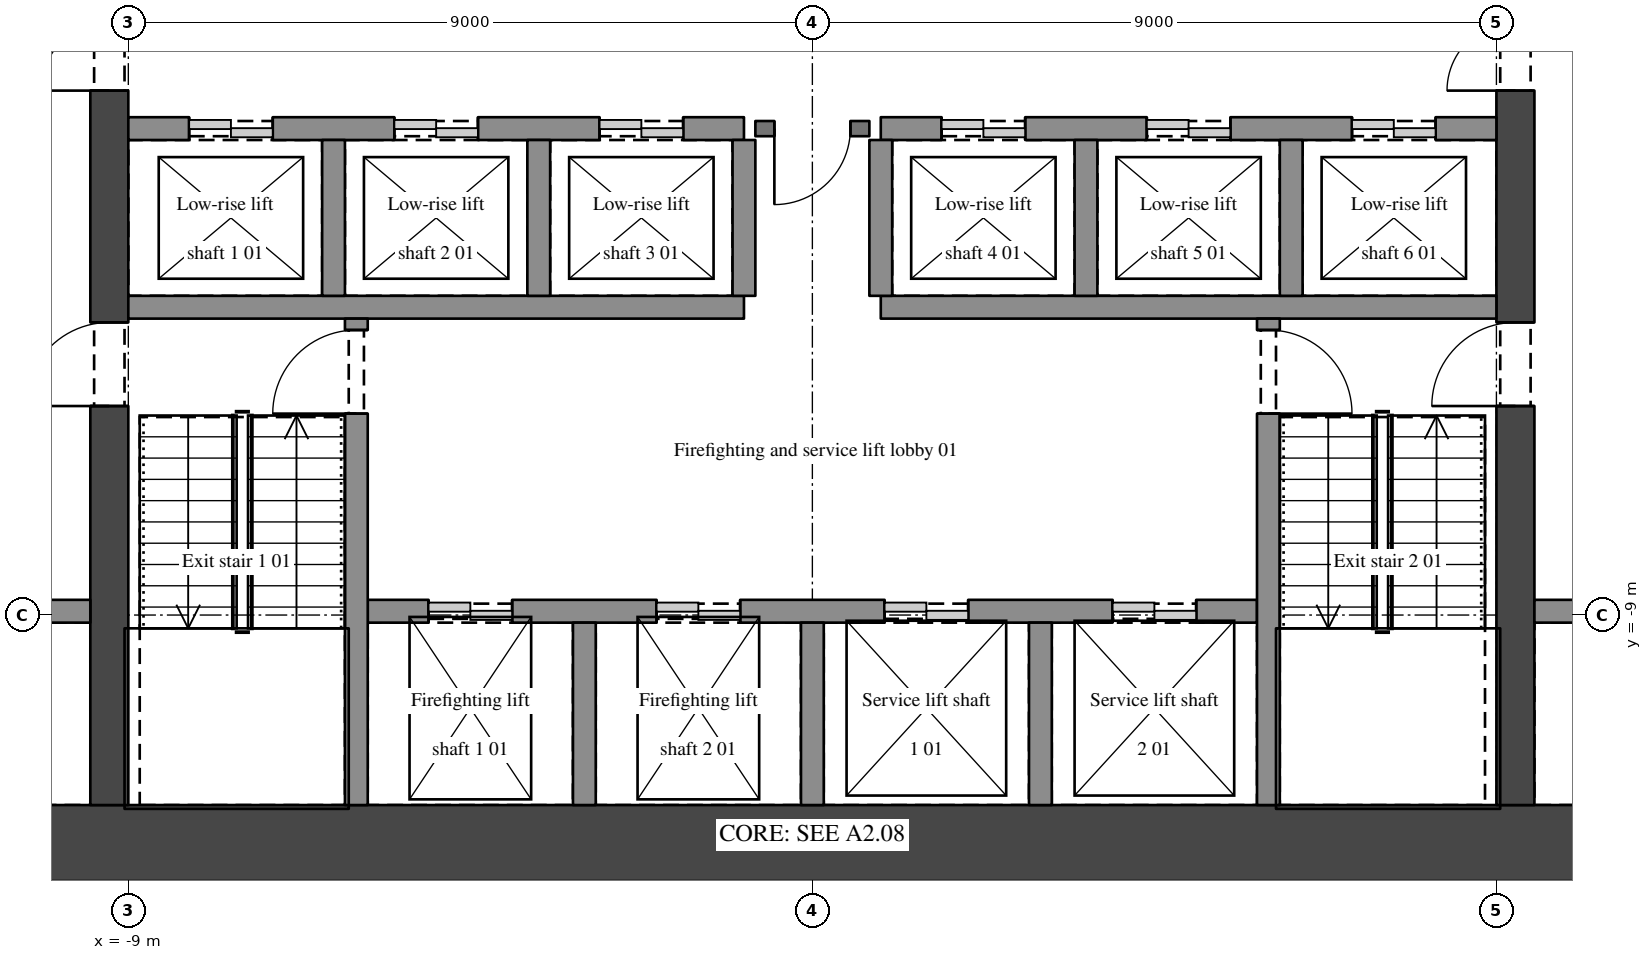
"""IFC4 building model, lengths in metres.
Left out: names, types, materials, properties, quantities, classifications, styles, units other than length and angle.
Written with IfcOpenShell. Run it as: python <this file> out.ifc"""

import sys

from ifc_helpers import new_model, si_unit, direction, frame, frame_2d, origin, place, context, subcontext, project, spatial, rectangle, extrude, element, fill, save


model = new_model("IFC4")
c1 = context("Model", 3, precision=1e-05, world=origin(), true_north=direction((0.0, 1.0)))
c2 = subcontext(c1, "Body", "Model", "MODEL_VIEW")
j1 = project(units=[si_unit("LENGTHUNIT", "METRE"), si_unit("PLANEANGLEUNIT", "RADIAN")], contexts=[c1])
p1 = place(None, origin())
s1 = spatial("IfcSite", under=j1, at=p1, CompositionType="ELEMENT")
p2 = place(p1, origin())
s2 = spatial("IfcBuilding", under=s1, at=p2, CompositionType="ELEMENT")
p3 = place(p2, frame((0.0, 0.0, 62.1)))
s3 = spatial("IfcBuildingStorey", under=s2, at=p3, CompositionType="ELEMENT", Elevation=62.1)
p4 = place(p3, frame((-15.0, -12.0, 0.0), z_axis=(0.0, 0.0, 1.0), x_axis=(1.0, 0.0, 0.0)))
e1 = element("IfcWall", 1, at=p4, inside=s3, PredefinedType="SHEAR", context=c2, shape_type="SweptSolid", body=[
    extrude(rectangle(XDim=30.0, YDim=1.0, at=frame_2d((15.0, 0.0))), origin(), (0.0, 0.0, 1.0), 3.9),
])
p5 = place(p3, frame((-9.25, -11.5, 0.0), z_axis=(0.0, 0.0, 1.0), x_axis=(0.0, 1.0, 0.0)))
e2 = element("IfcWall", 2, at=p5, inside=s3, PredefinedType="SHEAR", context=c2, shape_type="SweptSolid", body=[
    extrude(rectangle(XDim=11.65, YDim=0.5, at=frame_2d((5.825, 0.0))), origin(), (0.0, 0.0, 1.0), 3.9),
])
p6 = place(p5, frame((9.4, 0.0, 0.0)))
e3 = element("IfcOpeningElement", 3, at=p6, cuts=e2, PredefinedType="OPENING", context=c2, shape_type="SweptSolid", body=[
    extrude(rectangle(XDim=1.8, YDim=2.1, at=frame_2d((0.9, 1.05))), frame((0.0, 0.26, 0.0), z_axis=(0.0, -1.0, 0.0), x_axis=(1.0, 0.0, 0.0)), (0.0, 0.0, 1.0), 0.52),
])
p7 = place(p5, frame((5.25, 0.0, 0.0)))
e4 = element("IfcOpeningElement", 4, at=p7, cuts=e2, PredefinedType="OPENING", context=c2, shape_type="SweptSolid", body=[
    extrude(rectangle(XDim=1.1, YDim=2.1, at=frame_2d((0.55, 1.05))), frame((0.0, 0.26, 0.0), z_axis=(0.0, -1.0, 0.0), x_axis=(1.0, 0.0, 0.0)), (0.0, 0.0, 1.0), 0.52),
])
p8 = place(p3, frame((9.25, -11.5, 0.0), z_axis=(0.0, 0.0, 1.0), x_axis=(0.0, 1.0, 0.0)))
e5 = element("IfcWall", 5, at=p8, inside=s3, PredefinedType="SHEAR", context=c2, shape_type="SweptSolid", body=[
    extrude(rectangle(XDim=11.65, YDim=0.5, at=frame_2d((5.825, 0.0))), origin(), (0.0, 0.0, 1.0), 3.9),
])
p9 = place(p8, frame((9.4, 0.0, 0.0)))
e6 = element("IfcOpeningElement", 6, at=p9, cuts=e5, PredefinedType="OPENING", context=c2, shape_type="SweptSolid", body=[
    extrude(rectangle(XDim=1.8, YDim=2.1, at=frame_2d((0.9, 1.05))), frame((0.0, 0.26, 0.0), z_axis=(0.0, -1.0, 0.0), x_axis=(1.0, 0.0, 0.0)), (0.0, 0.0, 1.0), 0.52),
])
p10 = place(p8, frame((5.25, 0.0, 0.0)))
e7 = element("IfcOpeningElement", 7, at=p10, cuts=e5, PredefinedType="OPENING", context=c2, shape_type="SweptSolid", body=[
    extrude(rectangle(XDim=1.1, YDim=2.1, at=frame_2d((0.55, 1.05))), frame((0.0, 0.26, 0.0), z_axis=(0.0, -1.0, 0.0), x_axis=(1.0, 0.0, 0.0)), (0.0, 0.0, 1.0), 0.52),
])
p11 = place(p3, frame((-12.25, -8.95, 0.0), z_axis=(0.0, 0.0, 1.0), x_axis=(1.0, 0.0, 0.0)))
e8 = element("IfcWall", 8, at=p11, inside=s3, PredefinedType="SHEAR", context=c2, shape_type="SweptSolid", body=[
    extrude(rectangle(XDim=2.75, YDim=0.3, at=frame_2d((1.375, 0.0))), origin(), (0.0, 0.0, 1.0), 3.9),
])
p12 = place(p3, frame((-5.85, -8.95, 0.0), z_axis=(0.0, 0.0, 1.0), x_axis=(1.0, 0.0, 0.0)))
e9 = element("IfcWall", 9, at=p12, inside=s3, PredefinedType="SHEAR", context=c2, shape_type="SweptSolid", body=[
    extrude(rectangle(XDim=11.7, YDim=0.3, at=frame_2d((5.85, 0.0))), origin(), (0.0, 0.0, 1.0), 3.9),
])
p13 = place(p12, frame((0.8, 0.0, 0.0)))
e10 = element("IfcOpeningElement", 10, at=p13, cuts=e9, PredefinedType="OPENING", context=c2, shape_type="SweptSolid", body=[
    extrude(rectangle(XDim=1.1, YDim=2.1, at=frame_2d((0.55, 1.05))), frame((0.0, 0.16, 0.0), z_axis=(0.0, -1.0, 0.0), x_axis=(1.0, 0.0, 0.0)), (0.0, 0.0, 1.0), 0.32),
])
p14 = place(p12, frame((3.8, 0.0, 0.0)))
e11 = element("IfcOpeningElement", 11, at=p14, cuts=e9, PredefinedType="OPENING", context=c2, shape_type="SweptSolid", body=[
    extrude(rectangle(XDim=1.1, YDim=2.1, at=frame_2d((0.55, 1.05))), frame((0.0, 0.16, 0.0), z_axis=(0.0, -1.0, 0.0), x_axis=(1.0, 0.0, 0.0)), (0.0, 0.0, 1.0), 0.32),
])
p15 = place(p12, frame((6.8, 0.0, 0.0)))
e12 = element("IfcOpeningElement", 12, at=p15, cuts=e9, PredefinedType="OPENING", context=c2, shape_type="SweptSolid", body=[
    extrude(rectangle(XDim=1.1, YDim=2.1, at=frame_2d((0.55, 1.05))), frame((0.0, 0.16, 0.0), z_axis=(0.0, -1.0, 0.0), x_axis=(1.0, 0.0, 0.0)), (0.0, 0.0, 1.0), 0.32),
])
p16 = place(p12, frame((9.8, 0.0, 0.0)))
e13 = element("IfcOpeningElement", 13, at=p16, cuts=e9, PredefinedType="OPENING", context=c2, shape_type="SweptSolid", body=[
    extrude(rectangle(XDim=1.1, YDim=2.1, at=frame_2d((0.55, 1.05))), frame((0.0, 0.16, 0.0), z_axis=(0.0, -1.0, 0.0), x_axis=(1.0, 0.0, 0.0)), (0.0, 0.0, 1.0), 0.32),
])
p17 = place(p3, frame((9.5, -8.95, 0.0), z_axis=(0.0, 0.0, 1.0), x_axis=(1.0, 0.0, 0.0)))
e14 = element("IfcWall", 14, at=p17, inside=s3, PredefinedType="SHEAR", context=c2, shape_type="SweptSolid", body=[
    extrude(rectangle(XDim=2.75, YDim=0.3, at=frame_2d((1.375, 0.0))), origin(), (0.0, 0.0, 1.0), 3.9),
])
for number, where, z_axis, x_axis in (
    (15, (-9.0, -4.95, 0.0), (0.0, 0.0, 1.0), (1.0, 0.0, 0.0)),
    (16, (0.9, -4.95, 0.0), (0.0, 0.0, 1.0), (1.0, 0.0, 0.0)),
):
    element("IfcWall", number, at=place(p3, frame(where, z_axis=z_axis, x_axis=x_axis)), inside=s3, PredefinedType="SHEAR", context=c2, shape_type="SweptSolid", body=[
        extrude(rectangle(XDim=8.1, YDim=0.3, at=frame_2d((4.05, 0.0))), origin(), (0.0, 0.0, 1.0), 3.9),
    ])
p18 = place(p3, frame((-9.0, -2.6, 0.0), z_axis=(0.0, 0.0, 1.0), x_axis=(1.0, 0.0, 0.0)))
e17 = element("IfcWall", 17, at=p18, inside=s3, PredefinedType="SHEAR", context=c2, shape_type="SweptSolid", body=[
    extrude(rectangle(XDim=8.1, YDim=0.3, at=frame_2d((4.05, 0.0))), origin(), (0.0, 0.0, 1.0), 3.9),
])
p19 = place(p18, frame((0.8, 0.0, 0.0)))
e18 = element("IfcOpeningElement", 18, at=p19, cuts=e17, PredefinedType="OPENING", context=c2, shape_type="SweptSolid", body=[
    extrude(rectangle(XDim=1.1, YDim=2.1, at=frame_2d((0.55, 1.05))), frame((0.0, 0.16, 0.0), z_axis=(0.0, -1.0, 0.0), x_axis=(1.0, 0.0, 0.0)), (0.0, 0.0, 1.0), 0.32),
])
p20 = place(p18, frame((3.5, 0.0, 0.0)))
e19 = element("IfcOpeningElement", 19, at=p20, cuts=e17, PredefinedType="OPENING", context=c2, shape_type="SweptSolid", body=[
    extrude(rectangle(XDim=1.1, YDim=2.1, at=frame_2d((0.55, 1.05))), frame((0.0, 0.16, 0.0), z_axis=(0.0, -1.0, 0.0), x_axis=(1.0, 0.0, 0.0)), (0.0, 0.0, 1.0), 0.32),
])
p21 = place(p18, frame((6.2, 0.0, 0.0)))
e20 = element("IfcOpeningElement", 20, at=p21, cuts=e17, PredefinedType="OPENING", context=c2, shape_type="SweptSolid", body=[
    extrude(rectangle(XDim=1.1, YDim=2.1, at=frame_2d((0.55, 1.05))), frame((0.0, 0.16, 0.0), z_axis=(0.0, -1.0, 0.0), x_axis=(1.0, 0.0, 0.0)), (0.0, 0.0, 1.0), 0.32),
])
p22 = place(p3, frame((0.75, -2.6, 0.0), z_axis=(0.0, 0.0, 1.0), x_axis=(-1.0, 0.0, 0.0)))
e21 = element("IfcWall", 21, at=p22, inside=s3, PredefinedType="SOLIDWALL", context=c2, shape_type="SweptSolid", body=[
    extrude(rectangle(XDim=1.5, YDim=0.2, at=frame_2d((0.75, 0.0))), origin(), (0.0, 0.0, 1.0), 3.6),
])
p23 = place(p22, frame((0.25, 0.0, 0.0)))
e22 = element("IfcOpeningElement", 22, at=p23, cuts=e21, PredefinedType="OPENING", context=c2, shape_type="SweptSolid", body=[
    extrude(rectangle(XDim=1.0, YDim=2.1, at=frame_2d((0.5, 1.05))), frame((0.0, 0.11, 0.0), z_axis=(0.0, -1.0, 0.0), x_axis=(1.0, 0.0, 0.0)), (0.0, 0.0, 1.0), 0.22),
])
p24 = place(p3, frame((0.9, -2.6, 0.0), z_axis=(0.0, 0.0, 1.0), x_axis=(1.0, 0.0, 0.0)))
e23 = element("IfcWall", 23, at=p24, inside=s3, PredefinedType="SHEAR", context=c2, shape_type="SweptSolid", body=[
    extrude(rectangle(XDim=8.1, YDim=0.3, at=frame_2d((4.05, 0.0))), origin(), (0.0, 0.0, 1.0), 3.9),
])
p25 = place(p24, frame((0.8, 0.0, 0.0)))
e24 = element("IfcOpeningElement", 24, at=p25, cuts=e23, PredefinedType="OPENING", context=c2, shape_type="SweptSolid", body=[
    extrude(rectangle(XDim=1.1, YDim=2.1, at=frame_2d((0.55, 1.05))), frame((0.0, 0.16, 0.0), z_axis=(0.0, -1.0, 0.0), x_axis=(1.0, 0.0, 0.0)), (0.0, 0.0, 1.0), 0.32),
])
p26 = place(p24, frame((3.5, 0.0, 0.0)))
e25 = element("IfcOpeningElement", 25, at=p26, cuts=e23, PredefinedType="OPENING", context=c2, shape_type="SweptSolid", body=[
    extrude(rectangle(XDim=1.1, YDim=2.1, at=frame_2d((0.55, 1.05))), frame((0.0, 0.16, 0.0), z_axis=(0.0, -1.0, 0.0), x_axis=(1.0, 0.0, 0.0)), (0.0, 0.0, 1.0), 0.32),
])
p27 = place(p24, frame((6.2, 0.0, 0.0)))
e26 = element("IfcOpeningElement", 26, at=p27, cuts=e23, PredefinedType="OPENING", context=c2, shape_type="SweptSolid", body=[
    extrude(rectangle(XDim=1.1, YDim=2.1, at=frame_2d((0.55, 1.05))), frame((0.0, 0.16, 0.0), z_axis=(0.0, -1.0, 0.0), x_axis=(1.0, 0.0, 0.0)), (0.0, 0.0, 1.0), 0.32),
])
p28 = place(p3, frame((-6.3, -4.8, 0.0), z_axis=(0.0, 0.0, 1.0), x_axis=(0.0, 1.0, 0.0)))
e27 = element("IfcWall", 27, at=p28, inside=s3, PredefinedType="SHEAR", context=c2, shape_type="SweptSolid", body=[
    extrude(rectangle(XDim=2.05, YDim=0.3, at=frame_2d((1.025, 0.0))), origin(), (0.0, 0.0, 1.0), 3.9),
])
p29 = place(p3, frame((-6.0, -11.5, 0.0), z_axis=(0.0, 0.0, 1.0), x_axis=(0.0, 1.0, 0.0)))
e28 = element("IfcWall", 28, at=p29, inside=s3, PredefinedType="SHEAR", context=c2, shape_type="SweptSolid", body=[
    extrude(rectangle(XDim=6.4, YDim=0.3, at=frame_2d((3.2, 0.0))), origin(), (0.0, 0.0, 1.0), 3.9),
])
p30 = place(p29, frame((5.15, 0.0, 0.0)))
e29 = element("IfcOpeningElement", 29, at=p30, cuts=e28, PredefinedType="OPENING", context=c2, shape_type="SweptSolid", body=[
    extrude(rectangle(XDim=1.1, YDim=2.1, at=frame_2d((0.55, 1.05))), frame((0.0, 0.16, 0.0), z_axis=(0.0, -1.0, 0.0), x_axis=(1.0, 0.0, 0.0)), (0.0, 0.0, 1.0), 0.32),
])
p31 = place(p3, frame((-3.6, -4.8, 0.0), z_axis=(0.0, 0.0, 1.0), x_axis=(0.0, 1.0, 0.0)))
e30 = element("IfcWall", 30, at=p31, inside=s3, PredefinedType="SHEAR", context=c2, shape_type="SweptSolid", body=[
    extrude(rectangle(XDim=2.05, YDim=0.3, at=frame_2d((1.025, 0.0))), origin(), (0.0, 0.0, 1.0), 3.9),
])
p32 = place(p3, frame((-3.0, -11.5, 0.0), z_axis=(0.0, 0.0, 1.0), x_axis=(0.0, 1.0, 0.0)))
e31 = element("IfcWall", 31, at=p32, inside=s3, PredefinedType="SHEAR", context=c2, shape_type="SweptSolid", body=[
    extrude(rectangle(XDim=2.4, YDim=0.3, at=frame_2d((1.2, 0.0))), origin(), (0.0, 0.0, 1.0), 3.9),
])
p33 = place(p3, frame((-0.9, -4.8, 0.0), z_axis=(0.0, 0.0, 1.0), x_axis=(0.0, 1.0, 0.0)))
e32 = element("IfcWall", 32, at=p33, inside=s3, PredefinedType="SHEAR", context=c2, shape_type="SweptSolid", body=[
    extrude(rectangle(XDim=2.05, YDim=0.3, at=frame_2d((1.025, 0.0))), origin(), (0.0, 0.0, 1.0), 3.9),
])
p34 = place(p3, frame((0.0, -11.5, 0.0), z_axis=(0.0, 0.0, 1.0), x_axis=(0.0, 1.0, 0.0)))
e33 = element("IfcWall", 33, at=p34, inside=s3, PredefinedType="SHEAR", context=c2, shape_type="SweptSolid", body=[
    extrude(rectangle(XDim=2.4, YDim=0.3, at=frame_2d((1.2, 0.0))), origin(), (0.0, 0.0, 1.0), 3.9),
])
p35 = place(p3, frame((0.9, -4.8, 0.0), z_axis=(0.0, 0.0, 1.0), x_axis=(0.0, 1.0, 0.0)))
e34 = element("IfcWall", 34, at=p35, inside=s3, PredefinedType="SHEAR", context=c2, shape_type="SweptSolid", body=[
    extrude(rectangle(XDim=2.05, YDim=0.3, at=frame_2d((1.025, 0.0))), origin(), (0.0, 0.0, 1.0), 3.9),
])
p36 = place(p3, frame((3.0, -11.5, 0.0), z_axis=(0.0, 0.0, 1.0), x_axis=(0.0, 1.0, 0.0)))
e35 = element("IfcWall", 35, at=p36, inside=s3, PredefinedType="SHEAR", context=c2, shape_type="SweptSolid", body=[
    extrude(rectangle(XDim=2.4, YDim=0.3, at=frame_2d((1.2, 0.0))), origin(), (0.0, 0.0, 1.0), 3.9),
])
p37 = place(p3, frame((3.6, -4.8, 0.0), z_axis=(0.0, 0.0, 1.0), x_axis=(0.0, 1.0, 0.0)))
e36 = element("IfcWall", 36, at=p37, inside=s3, PredefinedType="SHEAR", context=c2, shape_type="SweptSolid", body=[
    extrude(rectangle(XDim=2.05, YDim=0.3, at=frame_2d((1.025, 0.0))), origin(), (0.0, 0.0, 1.0), 3.9),
])
p38 = place(p3, frame((6.0, -5.1, 0.0), z_axis=(0.0, 0.0, 1.0), x_axis=(0.0, -1.0, 0.0)))
e37 = element("IfcWall", 37, at=p38, inside=s3, PredefinedType="SHEAR", context=c2, shape_type="SweptSolid", body=[
    extrude(rectangle(XDim=6.4, YDim=0.3, at=frame_2d((3.2, 0.0))), origin(), (0.0, 0.0, 1.0), 3.9),
])
p39 = place(p38, frame((0.15, 0.0, 0.0)))
e38 = element("IfcOpeningElement", 38, at=p39, cuts=e37, PredefinedType="OPENING", context=c2, shape_type="SweptSolid", body=[
    extrude(rectangle(XDim=1.1, YDim=2.1, at=frame_2d((0.55, 1.05))), frame((0.0, 0.16, 0.0), z_axis=(0.0, -1.0, 0.0), x_axis=(1.0, 0.0, 0.0)), (0.0, 0.0, 1.0), 0.32),
])
p40 = place(p3, frame((6.3, -4.8, 0.0), z_axis=(0.0, 0.0, 1.0), x_axis=(0.0, 1.0, 0.0)))
e39 = element("IfcWall", 39, at=p40, inside=s3, PredefinedType="SHEAR", context=c2, shape_type="SweptSolid", body=[
    extrude(rectangle(XDim=2.05, YDim=0.3, at=frame_2d((1.025, 0.0))), origin(), (0.0, 0.0, 1.0), 3.9),
])
p41 = place(p9, origin())
e40 = element("IfcDoor", 40, at=p41, inside=s3, OperationType="DOUBLE_DOOR_SINGLE_SWING", PredefinedType="DOOR", context=c2, shape_type="SweptSolid", body=[
    extrude(rectangle(XDim=1.8, YDim=2.1, at=frame_2d((0.9, 1.05))), frame((0.0, 0.025, 0.0), z_axis=(0.0, -1.0, 0.0), x_axis=(1.0, 0.0, 0.0)), (0.0, 0.0, 1.0), 0.05),
])
fill(e6, e40)
p42 = place(p6, origin())
e41 = element("IfcDoor", 41, at=p42, inside=s3, OperationType="DOUBLE_DOOR_SINGLE_SWING", PredefinedType="DOOR", context=c2, shape_type="SweptSolid", body=[
    extrude(rectangle(XDim=1.8, YDim=2.1, at=frame_2d((0.9, 1.05))), frame((0.0, 0.025, 0.0), z_axis=(0.0, -1.0, 0.0), x_axis=(1.0, 0.0, 0.0)), (0.0, 0.0, 1.0), 0.05),
])
fill(e3, e41)
p43 = place(p23, origin())
e42 = element("IfcDoor", 42, at=p43, inside=s3, OperationType="SINGLE_SWING_RIGHT", PredefinedType="DOOR", context=c2, shape_type="SweptSolid", body=[
    extrude(rectangle(XDim=1.0, YDim=2.1, at=frame_2d((0.5, 1.05))), frame((0.0, 0.025, 0.0), z_axis=(0.0, -1.0, 0.0), x_axis=(1.0, 0.0, 0.0)), (0.0, 0.0, 1.0), 0.05),
])
fill(e22, e42)
p44 = place(p30, origin())
e43 = element("IfcDoor", 43, at=p44, inside=s3, OperationType="SINGLE_SWING_LEFT", PredefinedType="DOOR", context=c2, shape_type="SweptSolid", body=[
    extrude(rectangle(XDim=1.1, YDim=2.1, at=frame_2d((0.55, 1.05))), frame((0.0, 0.025, 0.0), z_axis=(0.0, -1.0, 0.0), x_axis=(1.0, 0.0, 0.0)), (0.0, 0.0, 1.0), 0.05),
])
fill(e29, e43)
p45 = place(p7, origin())
e44 = element("IfcDoor", 44, at=p45, inside=s3, OperationType="SINGLE_SWING_LEFT", PredefinedType="DOOR", context=c2, shape_type="SweptSolid", body=[
    extrude(rectangle(XDim=1.1, YDim=2.1, at=frame_2d((0.55, 1.05))), frame((0.0, 0.025, 0.0), z_axis=(0.0, -1.0, 0.0), x_axis=(1.0, 0.0, 0.0)), (0.0, 0.0, 1.0), 0.05),
])
fill(e4, e44)
p46 = place(p39, origin())
e45 = element("IfcDoor", 45, at=p46, inside=s3, OperationType="SINGLE_SWING_RIGHT", PredefinedType="DOOR", context=c2, shape_type="SweptSolid", body=[
    extrude(rectangle(XDim=1.1, YDim=2.1, at=frame_2d((0.55, 1.05))), frame((0.0, 0.025, 0.0), z_axis=(0.0, -1.0, 0.0), x_axis=(1.0, 0.0, 0.0)), (0.0, 0.0, 1.0), 0.05),
])
fill(e38, e45)
p47 = place(p10, origin())
e46 = element("IfcDoor", 46, at=p47, inside=s3, OperationType="SINGLE_SWING_LEFT", PredefinedType="DOOR", context=c2, shape_type="SweptSolid", body=[
    extrude(rectangle(XDim=1.1, YDim=2.1, at=frame_2d((0.55, 1.05))), frame((0.0, 0.025, 0.0), z_axis=(0.0, -1.0, 0.0), x_axis=(1.0, 0.0, 0.0)), (0.0, 0.0, 1.0), 0.05),
])
fill(e7, e46)
p48 = place(p13, origin())
e47 = element("IfcDoor", 47, at=p48, inside=s3, OperationType="DOUBLE_DOOR_SLIDING", PredefinedType="DOOR", context=c2, shape_type="SweptSolid", body=[
    extrude(rectangle(XDim=1.1, YDim=2.1, at=frame_2d((0.55, 1.05))), frame((0.0, 0.025, 0.0), z_axis=(0.0, -1.0, 0.0), x_axis=(1.0, 0.0, 0.0)), (0.0, 0.0, 1.0), 0.05),
])
fill(e10, e47)
p49 = place(p14, origin())
e48 = element("IfcDoor", 48, at=p49, inside=s3, OperationType="DOUBLE_DOOR_SLIDING", PredefinedType="DOOR", context=c2, shape_type="SweptSolid", body=[
    extrude(rectangle(XDim=1.1, YDim=2.1, at=frame_2d((0.55, 1.05))), frame((0.0, 0.025, 0.0), z_axis=(0.0, -1.0, 0.0), x_axis=(1.0, 0.0, 0.0)), (0.0, 0.0, 1.0), 0.05),
])
fill(e11, e48)
p50 = place(p19, origin())
e49 = element("IfcDoor", 49, at=p50, inside=s3, OperationType="DOUBLE_DOOR_SLIDING", PredefinedType="DOOR", context=c2, shape_type="SweptSolid", body=[
    extrude(rectangle(XDim=1.1, YDim=2.1, at=frame_2d((0.55, 1.05))), frame((0.0, 0.025, 0.0), z_axis=(0.0, -1.0, 0.0), x_axis=(1.0, 0.0, 0.0)), (0.0, 0.0, 1.0), 0.05),
])
fill(e18, e49)
p51 = place(p20, origin())
e50 = element("IfcDoor", 50, at=p51, inside=s3, OperationType="DOUBLE_DOOR_SLIDING", PredefinedType="DOOR", context=c2, shape_type="SweptSolid", body=[
    extrude(rectangle(XDim=1.1, YDim=2.1, at=frame_2d((0.55, 1.05))), frame((0.0, 0.025, 0.0), z_axis=(0.0, -1.0, 0.0), x_axis=(1.0, 0.0, 0.0)), (0.0, 0.0, 1.0), 0.05),
])
fill(e19, e50)
p52 = place(p21, origin())
e51 = element("IfcDoor", 51, at=p52, inside=s3, OperationType="DOUBLE_DOOR_SLIDING", PredefinedType="DOOR", context=c2, shape_type="SweptSolid", body=[
    extrude(rectangle(XDim=1.1, YDim=2.1, at=frame_2d((0.55, 1.05))), frame((0.0, 0.025, 0.0), z_axis=(0.0, -1.0, 0.0), x_axis=(1.0, 0.0, 0.0)), (0.0, 0.0, 1.0), 0.05),
])
fill(e20, e51)
p53 = place(p25, origin())
e52 = element("IfcDoor", 52, at=p53, inside=s3, OperationType="DOUBLE_DOOR_SLIDING", PredefinedType="DOOR", context=c2, shape_type="SweptSolid", body=[
    extrude(rectangle(XDim=1.1, YDim=2.1, at=frame_2d((0.55, 1.05))), frame((0.0, 0.025, 0.0), z_axis=(0.0, -1.0, 0.0), x_axis=(1.0, 0.0, 0.0)), (0.0, 0.0, 1.0), 0.05),
])
fill(e24, e52)
p54 = place(p26, origin())
e53 = element("IfcDoor", 53, at=p54, inside=s3, OperationType="DOUBLE_DOOR_SLIDING", PredefinedType="DOOR", context=c2, shape_type="SweptSolid", body=[
    extrude(rectangle(XDim=1.1, YDim=2.1, at=frame_2d((0.55, 1.05))), frame((0.0, 0.025, 0.0), z_axis=(0.0, -1.0, 0.0), x_axis=(1.0, 0.0, 0.0)), (0.0, 0.0, 1.0), 0.05),
])
fill(e25, e53)
p55 = place(p27, origin())
e54 = element("IfcDoor", 54, at=p55, inside=s3, OperationType="DOUBLE_DOOR_SLIDING", PredefinedType="DOOR", context=c2, shape_type="SweptSolid", body=[
    extrude(rectangle(XDim=1.1, YDim=2.1, at=frame_2d((0.55, 1.05))), frame((0.0, 0.025, 0.0), z_axis=(0.0, -1.0, 0.0), x_axis=(1.0, 0.0, 0.0)), (0.0, 0.0, 1.0), 0.05),
])
fill(e26, e54)
p56 = place(p15, origin())
e55 = element("IfcDoor", 55, at=p56, inside=s3, OperationType="DOUBLE_DOOR_SLIDING", PredefinedType="DOOR", context=c2, shape_type="SweptSolid", body=[
    extrude(rectangle(XDim=1.1, YDim=2.1, at=frame_2d((0.55, 1.05))), frame((0.0, 0.025, 0.0), z_axis=(0.0, -1.0, 0.0), x_axis=(1.0, 0.0, 0.0)), (0.0, 0.0, 1.0), 0.05),
])
fill(e12, e55)
p57 = place(p16, origin())
e56 = element("IfcDoor", 56, at=p57, inside=s3, OperationType="DOUBLE_DOOR_SLIDING", PredefinedType="DOOR", context=c2, shape_type="SweptSolid", body=[
    extrude(rectangle(XDim=1.1, YDim=2.1, at=frame_2d((0.55, 1.05))), frame((0.0, 0.025, 0.0), z_axis=(0.0, -1.0, 0.0), x_axis=(1.0, 0.0, 0.0)), (0.0, 0.0, 1.0), 0.05),
])
fill(e13, e56)
save(model, sys.argv[1])
